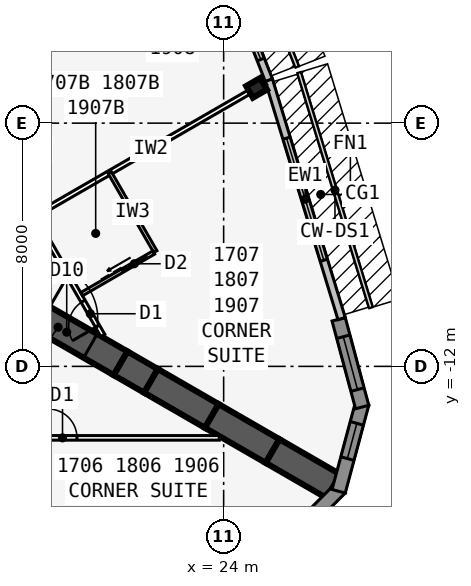
"""IFC4 building model, lengths in metres.
Left out: names, types, materials, properties, quantities, classifications, styles, units other than length and angle.
Written with IfcOpenShell. Run it as: python <this file> out.ifc"""

import sys

from ifc_helpers import new_model, si_unit, direction, frame, frame_2d, origin, origin_2d, place, context, subcontext, project, spatial, polyline, rectangle, i_section, outline, extrude, element, fill, save


model = new_model("IFC4")
c1 = context("Model", 3, precision=1e-05, world=origin(), true_north=direction((0.0, 1.0)))
c2 = subcontext(c1, "Body", "Model", "MODEL_VIEW")
j1 = project(units=[si_unit("LENGTHUNIT", "METRE"), si_unit("PLANEANGLEUNIT", "RADIAN")], contexts=[c1])
p1 = place(None, origin())
s1 = spatial("IfcSite", under=j1, at=p1, CompositionType="ELEMENT")
p2 = place(p1, origin())
s2 = spatial("IfcBuilding", under=s1, at=p2, CompositionType="ELEMENT")
p3 = place(p2, frame((0.0, 0.0, 69.3)))
s3 = spatial("IfcBuildingStorey", under=s2, at=p3, CompositionType="ELEMENT", Elevation=69.3)
p4 = place(p3, frame((16.5, -9.526, 0.0), z_axis=(0.0, 0.0, 1.0), x_axis=(0.866031398331, -0.499989616998, 0.0)))
e1 = element("IfcWall", 1, at=p4, inside=s3, PredefinedType="SHEAR", context=c2, shape_type="SweptSolid", body=[
    extrude(rectangle(XDim=4.746, YDim=0.9, at=frame_2d((2.373, 0.0))), origin(), (0.0, 0.0, 1.0), 3.4),
])
p5 = place(p4, frame((1.8, 0.0, 0.0)))
e2 = element("IfcOpeningElement", 2, at=p5, cuts=e1, PredefinedType="OPENING", context=c2, shape_type="SweptSolid", body=[
    extrude(rectangle(XDim=1.8, YDim=2.13, at=frame_2d((0.9, 1.065))), frame((0.0, 0.46, 0.0), z_axis=(0.0, -1.0, 0.0), x_axis=(1.0, 0.0, 0.0)), (0.0, 0.0, 1.0), 0.92),
])
p6 = place(p3, frame((20.61, -11.899, 0.0), z_axis=(0.0, 0.0, 1.0), x_axis=(0.866009537788, -0.500027479704, 0.0)))
e3 = element("IfcWall", 3, at=p6, inside=s3, PredefinedType="SHEAR", context=c2, shape_type="SweptSolid", body=[
    extrude(rectangle(XDim=1.155, YDim=0.9, at=frame_2d((0.577, 0.0))), origin(), (0.0, 0.0, 1.0), 3.4),
])
for number, where, z_axis, x_axis in (
    (4, (21.61, -12.477, 0.0), (0.0, 0.0, 1.0), (0.866, -0.5, 0.0)),
    (5, (23.61, -13.631, 0.0), (0.0, 0.0, 1.0), (0.866, -0.5, 0.0)),
    (6, (25.61, -14.786, 0.0), (0.0, 0.0, 1.0), (0.866, -0.5, 0.0)),
):
    element("IfcWall", number, at=place(p3, frame(where, z_axis=z_axis, x_axis=x_axis)), inside=s3, PredefinedType="SHEAR", context=c2, shape_type="SweptSolid", body=[
        extrude(rectangle(XDim=2.309, YDim=0.9, at=frame_2d((1.155, 0.0))), origin(), (0.0, 0.0, 1.0), 3.4),
    ])
p7 = place(p3, frame((25.083, -2.839, 0.0), z_axis=(0.0, 0.0, 1.0), x_axis=(-0.5, 0.866025403784, 0.0)))
e7 = element("IfcColumn", 7, at=p7, inside=s3, PredefinedType="COLUMN", context=c2, shape_type="SweptSolid", body=[
    extrude(i_section(OverallWidth=0.442, OverallDepth=0.531, WebThickness=0.066, FlangeThickness=0.106, at=origin_2d()), origin(), (0.0, 0.0, 1.0), 3.4),
])
p8 = place(p3, frame((25.728, -18.12, 0.0), z_axis=(0.0, 0.0, 1.0), x_axis=(0.707025086683, 0.707188466253, 0.0)))
e8 = element("IfcWall", 8, at=p8, inside=s3, PredefinedType="SOLIDWALL", context=c2, shape_type="SweptSolid", body=[
    extrude(outline(polyline([(2.989, 0.225), (2.93, 0.225), (2.438, 0.093), (2.402, 0.225), (0.0, 0.225), (0.0, -0.225), (2.989, -0.225), (2.989, 0.225)])), origin(), (0.0, 0.0, 1.0), 3.235),
])
p9 = place(p8, frame((0.676, 0.0, 0.45)))
e9 = element("IfcOpeningElement", 9, at=p9, cuts=e8, PredefinedType="OPENING", context=c2, shape_type="SweptSolid", body=[
    extrude(rectangle(XDim=1.2, YDim=2.4, at=frame_2d((0.6, 1.2))), frame((0.0, 0.235, 0.0), z_axis=(0.0, -1.0, 0.0), x_axis=(1.0, 0.0, 0.0)), (0.0, 0.0, 1.0), 0.47),
])
p10 = place(p3, frame((27.783, -16.108, 0.0), z_axis=(0.0, 0.0, 1.0), x_axis=(0.258801419081, 0.965930548995, 0.0)))
e10 = element("IfcWall", 10, at=p10, inside=s3, PredefinedType="SOLIDWALL", context=c2, shape_type="SweptSolid", body=[
    extrude(outline(polyline([(2.989, 0.225), (0.586, 0.225), (0.551, 0.093), (0.06, 0.225), (0.0, 0.225), (0.0, -0.225), (2.989, -0.225), (2.989, 0.225)])), origin(), (0.0, 0.0, 1.0), 3.235),
])
p11 = place(p10, frame((1.113, 0.0, 0.45)))
e11 = element("IfcOpeningElement", 11, at=p11, cuts=e10, PredefinedType="OPENING", context=c2, shape_type="SweptSolid", body=[
    extrude(rectangle(XDim=1.2, YDim=2.4, at=frame_2d((0.6, 1.2))), frame((0.0, 0.235, 0.0), z_axis=(0.0, -1.0, 0.0), x_axis=(1.0, 0.0, 0.0)), (0.0, 0.0, 1.0), 0.47),
])
p12 = place(p3, frame((28.556, -13.337, 0.0), z_axis=(0.0, 0.0, 1.0), x_axis=(-0.258780998834, 0.965936019953, 0.0)))
e12 = element("IfcWall", 12, at=p12, inside=s3, PredefinedType="SOLIDWALL", context=c2, shape_type="SweptSolid", body=[
    extrude(rectangle(XDim=2.989, YDim=0.45, at=frame_2d((1.494, 0.0))), origin(), (0.0, 0.0, 1.0), 3.235),
])
p13 = place(p12, frame((0.594, 0.0, 0.45)))
e13 = element("IfcOpeningElement", 13, at=p13, cuts=e12, PredefinedType="OPENING", context=c2, shape_type="SweptSolid", body=[
    extrude(rectangle(XDim=1.8, YDim=2.4, at=frame_2d((0.9, 1.2))), frame((0.0, 0.235, 0.0), z_axis=(0.0, -1.0, 0.0), x_axis=(1.0, 0.0, 0.0)), (0.0, 0.0, 1.0), 0.47),
])
p14 = place(p3, frame((27.88, -10.429, 0.0), z_axis=(0.0, 0.0, 1.0), x_axis=(-0.2919790669, 0.956424709265, 0.0)))
e14 = element("IfcWall", 14, at=p14, inside=s3, PredefinedType="STANDARD", context=c2, shape_type="SweptSolid", body=[
    extrude(rectangle(XDim=8.211, YDim=0.25, at=frame_2d((4.105, 0.0))), origin(), (0.0, 0.0, 1.0), 3.235),
])
p15 = place(p14, frame((2.006, 0.0, 0.45)))
e15 = element("IfcOpeningElement", 15, at=p15, cuts=e14, PredefinedType="OPENING", context=c2, shape_type="SweptSolid", body=[
    extrude(rectangle(XDim=4.2, YDim=2.4, at=frame_2d((2.1, 1.2))), frame((0.0, 0.135, 0.0), z_axis=(0.0, -1.0, 0.0), x_axis=(1.0, 0.0, 0.0)), (0.0, 0.0, 1.0), 0.27),
])
p16 = place(p3, frame((25.486, -2.584, 0.0), z_axis=(0.0, 0.0, 1.0), x_axis=(-0.364013463868, 0.931393685894, 0.0)))
e16 = element("IfcWall", 16, at=p16, inside=s3, PredefinedType="STANDARD", context=c2, shape_type="SweptSolid", body=[
    extrude(rectangle(XDim=5.058, YDim=0.25, at=frame_2d((2.529, 0.0))), origin(), (0.0, 0.0, 1.0), 3.235),
])
p17 = place(p16, frame((0.729, 0.0, 0.45)))
e17 = element("IfcOpeningElement", 17, at=p17, cuts=e16, PredefinedType="OPENING", context=c2, shape_type="SweptSolid", body=[
    extrude(rectangle(XDim=3.6, YDim=2.4, at=frame_2d((1.8, 1.2))), frame((0.0, 0.135, 0.0), z_axis=(0.0, -1.0, 0.0), x_axis=(1.0, 0.0, 0.0)), (0.0, 0.0, 1.0), 0.27),
])
p18 = place(p3, frame((-23.857, -14.351, 0.0), z_axis=(0.0, 0.0, 1.0), x_axis=(1.0, 0.0, 0.0)))
e18 = element("IfcWall", 18, at=p18, inside=s3, PredefinedType="PARTITIONING", context=c2, shape_type="SweptSolid", body=[
    extrude(rectangle(XDim=47.714, YDim=0.15, at=frame_2d((23.857, 0.0))), origin(), (0.0, 0.0, 1.0), 3.235),
])
p19 = place(p18, frame((4.682, 0.0, 0.0)))
e19 = element("IfcOpeningElement", 19, at=p19, cuts=e18, PredefinedType="OPENING", context=c2, shape_type="SweptSolid", body=[
    extrude(rectangle(XDim=0.95, YDim=2.13, at=frame_2d((0.475, 1.065))), frame((0.0, 0.085, 0.0), z_axis=(0.0, -1.0, 0.0), x_axis=(1.0, 0.0, 0.0)), (0.0, 0.0, 1.0), 0.17),
])
p20 = place(p18, frame((10.282, 0.0, 0.0)))
e20 = element("IfcOpeningElement", 20, at=p20, cuts=e18, PredefinedType="OPENING", context=c2, shape_type="SweptSolid", body=[
    extrude(rectangle(XDim=0.95, YDim=2.13, at=frame_2d((0.475, 1.065))), frame((0.0, 0.085, 0.0), z_axis=(0.0, -1.0, 0.0), x_axis=(1.0, 0.0, 0.0)), (0.0, 0.0, 1.0), 0.17),
])
p21 = place(p18, frame((15.882, 0.0, 0.0)))
e21 = element("IfcOpeningElement", 21, at=p21, cuts=e18, PredefinedType="OPENING", context=c2, shape_type="SweptSolid", body=[
    extrude(rectangle(XDim=0.95, YDim=2.13, at=frame_2d((0.475, 1.065))), frame((0.0, 0.085, 0.0), z_axis=(0.0, -1.0, 0.0), x_axis=(1.0, 0.0, 0.0)), (0.0, 0.0, 1.0), 0.17),
])
p22 = place(p18, frame((25.857, 0.0, 0.0)))
e22 = element("IfcOpeningElement", 22, at=p22, cuts=e18, PredefinedType="OPENING", context=c2, shape_type="SweptSolid", body=[
    extrude(rectangle(XDim=1.0, YDim=2.13, at=frame_2d((0.5, 1.065))), frame((0.0, 0.085, 0.0), z_axis=(0.0, -1.0, 0.0), x_axis=(1.0, 0.0, 0.0)), (0.0, 0.0, 1.0), 0.17),
])
p23 = place(p18, frame((29.682, 0.0, 0.0)))
e23 = element("IfcOpeningElement", 23, at=p23, cuts=e18, PredefinedType="OPENING", context=c2, shape_type="SweptSolid", body=[
    extrude(rectangle(XDim=0.95, YDim=2.13, at=frame_2d((0.475, 1.065))), frame((0.0, 0.085, 0.0), z_axis=(0.0, -1.0, 0.0), x_axis=(1.0, 0.0, 0.0)), (0.0, 0.0, 1.0), 0.17),
])
p24 = place(p18, frame((36.482, 0.0, 0.0)))
e24 = element("IfcOpeningElement", 24, at=p24, cuts=e18, PredefinedType="OPENING", context=c2, shape_type="SweptSolid", body=[
    extrude(rectangle(XDim=0.95, YDim=2.13, at=frame_2d((0.475, 1.065))), frame((0.0, 0.085, 0.0), z_axis=(0.0, -1.0, 0.0), x_axis=(1.0, 0.0, 0.0)), (0.0, 0.0, 1.0), 0.17),
])
p25 = place(p18, frame((42.082, 0.0, 0.0)))
e25 = element("IfcOpeningElement", 25, at=p25, cuts=e18, PredefinedType="OPENING", context=c2, shape_type="SweptSolid", body=[
    extrude(rectangle(XDim=0.95, YDim=2.13, at=frame_2d((0.475, 1.065))), frame((0.0, 0.085, 0.0), z_axis=(0.0, -1.0, 0.0), x_axis=(1.0, 0.0, 0.0)), (0.0, 0.0, 1.0), 0.17),
])
p26 = place(p3, frame((20.027, -10.985, 0.0), z_axis=(0.0, 0.0, 1.0), x_axis=(-0.500001677587, 0.866024435227, 0.0)))
e26 = element("IfcWall", 26, at=p26, inside=s3, PredefinedType="PARTITIONING", context=c2, shape_type="SweptSolid", body=[
    extrude(rectangle(XDim=39.054, YDim=0.15, at=frame_2d((19.527, 0.0))), origin(), (0.0, 0.0, 1.0), 3.235),
])
p27 = place(p26, frame((0.352, 0.0, 0.0)))
e27 = element("IfcOpeningElement", 27, at=p27, cuts=e26, PredefinedType="OPENING", context=c2, shape_type="SweptSolid", body=[
    extrude(rectangle(XDim=0.95, YDim=2.13, at=frame_2d((0.475, 1.065))), frame((0.0, 0.085, 0.0), z_axis=(0.0, -1.0, 0.0), x_axis=(1.0, 0.0, 0.0)), (0.0, 0.0, 1.0), 0.17),
])
p28 = place(p26, frame((6.552, 0.0, 0.0)))
e28 = element("IfcOpeningElement", 28, at=p28, cuts=e26, PredefinedType="OPENING", context=c2, shape_type="SweptSolid", body=[
    extrude(rectangle(XDim=0.95, YDim=2.13, at=frame_2d((0.475, 1.065))), frame((0.0, 0.085, 0.0), z_axis=(0.0, -1.0, 0.0), x_axis=(1.0, 0.0, 0.0)), (0.0, 0.0, 1.0), 0.17),
])
p29 = place(p26, frame((16.552, 0.0, 0.0)))
e29 = element("IfcOpeningElement", 29, at=p29, cuts=e26, PredefinedType="OPENING", context=c2, shape_type="SweptSolid", body=[
    extrude(rectangle(XDim=0.95, YDim=2.13, at=frame_2d((0.475, 1.065))), frame((0.0, 0.085, 0.0), z_axis=(0.0, -1.0, 0.0), x_axis=(1.0, 0.0, 0.0)), (0.0, 0.0, 1.0), 0.17),
])
p30 = place(p26, frame((25.952, 0.0, 0.0)))
e30 = element("IfcOpeningElement", 30, at=p30, cuts=e26, PredefinedType="OPENING", context=c2, shape_type="SweptSolid", body=[
    extrude(rectangle(XDim=0.95, YDim=2.13, at=frame_2d((0.475, 1.065))), frame((0.0, 0.085, 0.0), z_axis=(0.0, -1.0, 0.0), x_axis=(1.0, 0.0, 0.0)), (0.0, 0.0, 1.0), 0.17),
])
p31 = place(p26, frame((36.546, 0.0, 0.0)))
e31 = element("IfcOpeningElement", 31, at=p31, cuts=e26, PredefinedType="OPENING", context=c2, shape_type="SweptSolid", body=[
    extrude(rectangle(XDim=0.95, YDim=2.13, at=frame_2d((0.475, 1.065))), frame((0.0, 0.085, 0.0), z_axis=(0.0, -1.0, 0.0), x_axis=(1.0, 0.0, 0.0)), (0.0, 0.0, 1.0), 0.17),
])
p32 = place(p3, frame((17.829, -7.027, 0.0), z_axis=(0.0, 0.0, 1.0), x_axis=(0.866032659912, 0.499987431809, 0.0)))
e32 = element("IfcWall", 32, at=p32, inside=s3, PredefinedType="PARTITIONING", context=c2, shape_type="SweptSolid", body=[
    extrude(rectangle(XDim=8.72, YDim=0.15, at=frame_2d((4.36, 0.0))), origin(), (0.0, 0.0, 1.0), 2.389),
])
p33 = place(p3, frame((15.329, -2.697, 0.0), z_axis=(0.0, 0.0, 1.0), x_axis=(0.866018409083, 0.500012114982, 0.0)))
e33 = element("IfcWall", 33, at=p33, inside=s3, PredefinedType="PARTITIONING", context=c2, shape_type="SweptSolid", body=[
    extrude(rectangle(XDim=9.485, YDim=0.1, at=frame_2d((4.742, 0.0))), origin(), (0.0, 0.0, 1.0), 2.389),
])
p34 = place(p33, frame((0.45, 0.0, 0.0)))
e34 = element("IfcOpeningElement", 34, at=p34, cuts=e33, PredefinedType="OPENING", context=c2, shape_type="SweptSolid", body=[
    extrude(rectangle(XDim=0.9, YDim=2.13, at=frame_2d((0.45, 1.065))), frame((0.0, 0.06, 0.0), z_axis=(0.0, -1.0, 0.0), x_axis=(1.0, 0.0, 0.0)), (0.0, 0.0, 1.0), 0.12),
])
p35 = place(p3, frame((21.753, -8.225, 0.0), z_axis=(0.0, 0.0, 1.0), x_axis=(-0.499990139034, 0.866031096941, 0.0)))
e35 = element("IfcWall", 35, at=p35, inside=s3, PredefinedType="PLUMBINGWALL", context=c2, shape_type="SweptSolid", body=[
    extrude(rectangle(XDim=3.0, YDim=0.12, at=frame_2d((1.5, 0.0))), origin(), (0.0, 0.0, 1.0), 3.235),
])
p36 = place(p3, frame((19.329, -9.625, 0.0), z_axis=(0.0, 0.0, 1.0), x_axis=(0.866035715982, 0.499982138324, 0.0)))
e36 = element("IfcWall", 36, at=p36, inside=s3, PredefinedType="PLUMBINGWALL", context=c2, shape_type="SweptSolid", body=[
    extrude(rectangle(XDim=2.74, YDim=0.12, at=frame_2d((1.37, 0.0))), origin(), (0.0, 0.0, 1.0), 3.235),
])
p37 = place(p36, frame((1.55, 0.0, 0.0)))
e37 = element("IfcOpeningElement", 37, at=p37, cuts=e36, PredefinedType="OPENING", context=c2, shape_type="SweptSolid", body=[
    extrude(rectangle(XDim=0.9, YDim=2.13, at=frame_2d((0.45, 1.065))), frame((0.0, 0.07, 0.0), z_axis=(0.0, -1.0, 0.0), x_axis=(1.0, 0.0, 0.0)), (0.0, 0.0, 1.0), 0.14),
])
p38 = place(p11, origin())
e38 = element("IfcWindow", 38, at=p38, inside=s3, PartitioningType="SINGLE_PANEL", PredefinedType="WINDOW", context=c2, shape_type="SweptSolid", body=[
    extrude(rectangle(XDim=1.2, YDim=2.4, at=frame_2d((0.6, 1.2))), frame((0.0, 0.03, 0.0), z_axis=(0.0, -1.0, 0.0), x_axis=(1.0, 0.0, 0.0)), (0.0, 0.0, 1.0), 0.06),
])
fill(e11, e38)
p39 = place(p13, origin())
e39 = element("IfcWindow", 39, at=p39, inside=s3, PartitioningType="SINGLE_PANEL", PredefinedType="WINDOW", context=c2, shape_type="SweptSolid", body=[
    extrude(rectangle(XDim=1.8, YDim=2.4, at=frame_2d((0.9, 1.2))), frame((0.0, 0.03, 0.0), z_axis=(0.0, -1.0, 0.0), x_axis=(1.0, 0.0, 0.0)), (0.0, 0.0, 1.0), 0.06),
])
fill(e13, e39)
p40 = place(p15, origin())
e40 = element("IfcWindow", 40, at=p40, inside=s3, PartitioningType="SINGLE_PANEL", PredefinedType="WINDOW", context=c2, shape_type="SweptSolid", body=[
    extrude(rectangle(XDim=4.2, YDim=2.4, at=frame_2d((2.1, 1.2))), frame((0.0, 0.03, 0.0), z_axis=(0.0, -1.0, 0.0), x_axis=(1.0, 0.0, 0.0)), (0.0, 0.0, 1.0), 0.06),
])
fill(e15, e40)
p41 = place(p17, origin())
e41 = element("IfcWindow", 41, at=p41, inside=s3, PartitioningType="SINGLE_PANEL", PredefinedType="WINDOW", context=c2, shape_type="SweptSolid", body=[
    extrude(rectangle(XDim=3.6, YDim=2.4, at=frame_2d((1.8, 1.2))), frame((0.0, 0.03, 0.0), z_axis=(0.0, -1.0, 0.0), x_axis=(1.0, 0.0, 0.0)), (0.0, 0.0, 1.0), 0.06),
])
fill(e17, e41)
p42 = place(p25, origin())
e42 = element("IfcDoor", 42, at=p42, inside=s3, OperationType="SINGLE_SWING_LEFT", PredefinedType="DOOR", context=c2, shape_type="SweptSolid", body=[
    extrude(rectangle(XDim=0.95, YDim=2.13, at=frame_2d((0.475, 1.065))), frame((0.0, 0.025, 0.0), z_axis=(0.0, -1.0, 0.0), x_axis=(1.0, 0.0, 0.0)), (0.0, 0.0, 1.0), 0.05),
])
fill(e25, e42)
p43 = place(p37, origin())
e43 = element("IfcDoor", 43, at=p43, inside=s3, OperationType="SLIDING_TO_LEFT", PredefinedType="DOOR", context=c2, shape_type="SweptSolid", body=[
    extrude(rectangle(XDim=0.9, YDim=2.13, at=frame_2d((0.45, 1.065))), frame((0.0, 0.025, 0.0), z_axis=(0.0, -1.0, 0.0), x_axis=(1.0, 0.0, 0.0)), (0.0, 0.0, 1.0), 0.05),
])
fill(e37, e43)
p44 = place(p27, origin())
e44 = element("IfcDoor", 44, at=p44, inside=s3, OperationType="SINGLE_SWING_LEFT", PredefinedType="DOOR", context=c2, shape_type="SweptSolid", body=[
    extrude(rectangle(XDim=0.95, YDim=2.13, at=frame_2d((0.475, 1.065))), frame((0.0, 0.025, 0.0), z_axis=(0.0, -1.0, 0.0), x_axis=(1.0, 0.0, 0.0)), (0.0, 0.0, 1.0), 0.05),
])
fill(e27, e44)
p45 = place(p5, origin())
e45 = element("IfcDoor", 45, at=p45, inside=s3, OperationType="DOUBLE_DOOR_DOUBLE_SWING", PredefinedType="DOOR", context=c2, shape_type="SweptSolid", body=[
    extrude(rectangle(XDim=1.8, YDim=2.13, at=frame_2d((0.9, 1.065))), frame((0.0, 0.025, 0.0), z_axis=(0.0, -1.0, 0.0), x_axis=(1.0, 0.0, 0.0)), (0.0, 0.0, 1.0), 0.05),
])
fill(e2, e45)
save(model, sys.argv[1])
